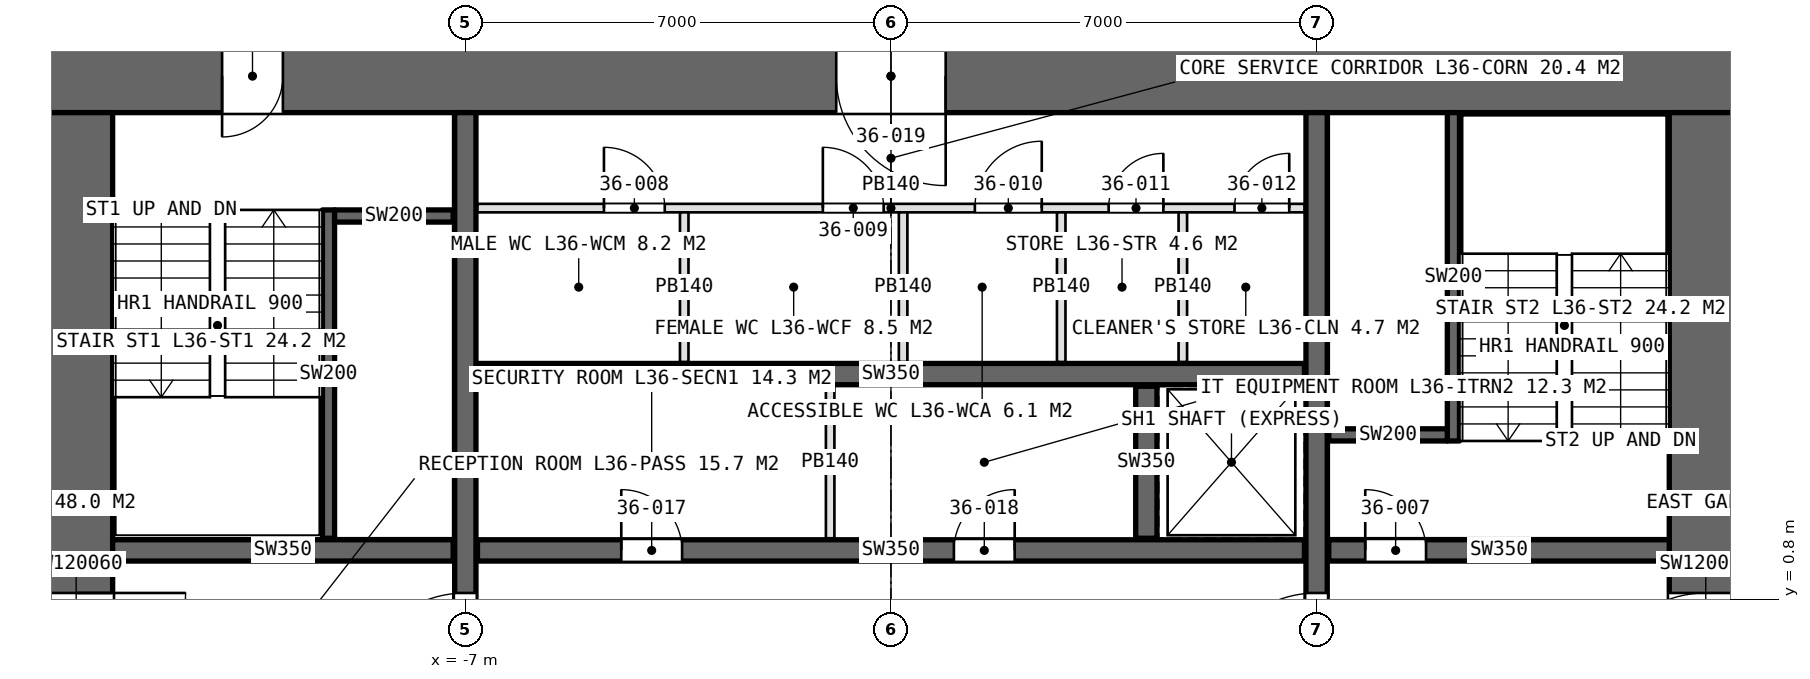
"""IFC4 building model, lengths in metres.
Left out: names, types, materials, properties, quantities, classifications, styles, units other than length and angle.
Written with IfcOpenShell. Run it as: python <this file> out.ifc"""

import sys

from ifc_helpers import new_model, si_unit, direction, frame, frame_2d, origin, place, context, subcontext, project, spatial, rectangle, extrude, element, fill, save


model = new_model("IFC4")
c1 = context("Model", 3, precision=1e-05, world=origin(), true_north=direction((0.0, 1.0)))
c2 = subcontext(c1, "Body", "Model", "MODEL_VIEW")
j1 = project(units=[si_unit("LENGTHUNIT", "METRE"), si_unit("PLANEANGLEUNIT", "RADIAN")], contexts=[c1])
p1 = place(None, origin())
s1 = spatial("IfcSite", under=j1, at=p1, CompositionType="ELEMENT")
p2 = place(p1, origin())
s2 = spatial("IfcBuilding", under=s1, at=p2, CompositionType="ELEMENT")
p3 = place(p2, frame((0.0, 0.0, 168.0)))
s3 = spatial("IfcBuildingStorey", under=s2, at=p3, CompositionType="ELEMENT", Elevation=168.0)
p4 = place(p3, frame((14.0, 9.4, 0.0), z_axis=(0.0, 0.0, 1.0), x_axis=(-1.0, 0.0, 0.0)))
e1 = element("IfcWall", 1, at=p4, inside=s3, PredefinedType="SHEAR", context=c2, shape_type="SweptSolid", body=[
    extrude(rectangle(XDim=28.0, YDim=1.2, at=frame_2d((14.0, 0.0))), origin(), (0.0, 0.0, 1.0), 4.2),
])
p5 = place(p4, frame((24.0, 0.0, 0.0)))
e2 = element("IfcOpeningElement", 2, at=p5, cuts=e1, PredefinedType="OPENING", context=c2, shape_type="SweptSolid", body=[
    extrude(rectangle(XDim=1.0, YDim=2.4, at=frame_2d((0.5, 1.2))), frame((0.0, 0.61, 0.0), z_axis=(0.0, -1.0, 0.0), x_axis=(1.0, 0.0, 0.0)), (0.0, 0.0, 1.0), 1.22),
])
p6 = place(p4, frame((13.1, 0.0, 0.0)))
e3 = element("IfcOpeningElement", 3, at=p6, cuts=e1, PredefinedType="OPENING", context=c2, shape_type="SweptSolid", body=[
    extrude(rectangle(XDim=1.8, YDim=2.4, at=frame_2d((0.9, 1.2))), frame((0.0, 0.61, 0.0), z_axis=(0.0, -1.0, 0.0), x_axis=(1.0, 0.0, 0.0)), (0.0, 0.0, 1.0), 1.22),
])
p7 = place(p3, frame((-13.4, 8.8, 0.0), z_axis=(0.0, 0.0, 1.0), x_axis=(0.0, -1.0, 0.0)))
e4 = element("IfcWall", 4, at=p7, inside=s3, PredefinedType="SHEAR", context=c2, shape_type="SweptSolid", body=[
    extrude(rectangle(XDim=17.6, YDim=1.2, at=frame_2d((8.8, 0.0))), origin(), (0.0, 0.0, 1.0), 4.2),
])
p8 = place(p7, frame((7.9, 0.0, 0.0)))
e5 = element("IfcOpeningElement", 5, at=p8, cuts=e4, PredefinedType="OPENING", context=c2, shape_type="SweptSolid", body=[
    extrude(rectangle(XDim=1.8, YDim=2.4, at=frame_2d((0.9, 1.2))), frame((0.0, 0.61, 0.0), z_axis=(0.0, -1.0, 0.0), x_axis=(1.0, 0.0, 0.0)), (0.0, 0.0, 1.0), 1.22),
])
p9 = place(p7, frame((16.5, 0.0, 0.0)))
e6 = element("IfcOpeningElement", 6, at=p9, cuts=e4, PredefinedType="OPENING", context=c2, shape_type="SweptSolid", body=[
    extrude(rectangle(XDim=1.0, YDim=2.4, at=frame_2d((0.5, 1.2))), frame((0.0, 0.61, 0.0), z_axis=(0.0, -1.0, 0.0), x_axis=(1.0, 0.0, 0.0)), (0.0, 0.0, 1.0), 1.22),
])
p10 = place(p3, frame((13.4, -8.8, 0.0), z_axis=(0.0, 0.0, 1.0), x_axis=(0.0, 1.0, 0.0)))
e7 = element("IfcWall", 7, at=p10, inside=s3, PredefinedType="SHEAR", context=c2, shape_type="SweptSolid", body=[
    extrude(rectangle(XDim=17.6, YDim=1.2, at=frame_2d((8.8, 0.0))), origin(), (0.0, 0.0, 1.0), 4.2),
])
p11 = place(p10, frame((7.9, 0.0, 0.0)))
e8 = element("IfcOpeningElement", 8, at=p11, cuts=e7, PredefinedType="OPENING", context=c2, shape_type="SweptSolid", body=[
    extrude(rectangle(XDim=1.8, YDim=2.4, at=frame_2d((0.9, 1.2))), frame((0.0, 0.61, 0.0), z_axis=(0.0, -1.0, 0.0), x_axis=(1.0, 0.0, 0.0)), (0.0, 0.0, 1.0), 1.22),
])
p12 = place(p3, frame((-7.0, -8.8, 0.0), z_axis=(0.0, 0.0, 1.0), x_axis=(0.0, 1.0, 0.0)))
e9 = element("IfcWall", 9, at=p12, inside=s3, PredefinedType="SHEAR", context=c2, shape_type="SweptSolid", body=[
    extrude(rectangle(XDim=17.6, YDim=0.35, at=frame_2d((8.8, 0.0))), origin(), (0.0, 0.0, 1.0), 4.2),
])
p13 = place(p12, frame((7.9, 0.0, 0.0)))
e10 = element("IfcOpeningElement", 10, at=p13, cuts=e9, PredefinedType="OPENING", context=c2, shape_type="SweptSolid", body=[
    extrude(rectangle(XDim=1.8, YDim=2.4, at=frame_2d((0.9, 1.2))), frame((0.0, 0.185, 0.0), z_axis=(0.0, -1.0, 0.0), x_axis=(1.0, 0.0, 0.0)), (0.0, 0.0, 1.0), 0.37),
])
p14 = place(p3, frame((7.0, -8.8, 0.0), z_axis=(0.0, 0.0, 1.0), x_axis=(0.0, 1.0, 0.0)))
e11 = element("IfcWall", 11, at=p14, inside=s3, PredefinedType="SHEAR", context=c2, shape_type="SweptSolid", body=[
    extrude(rectangle(XDim=17.6, YDim=0.35, at=frame_2d((8.8, 0.0))), origin(), (0.0, 0.0, 1.0), 4.2),
])
p15 = place(p14, frame((7.9, 0.0, 0.0)))
e12 = element("IfcOpeningElement", 12, at=p15, cuts=e11, PredefinedType="OPENING", context=c2, shape_type="SweptSolid", body=[
    extrude(rectangle(XDim=1.8, YDim=2.4, at=frame_2d((0.9, 1.2))), frame((0.0, 0.185, 0.0), z_axis=(0.0, -1.0, 0.0), x_axis=(1.0, 0.0, 0.0)), (0.0, 0.0, 1.0), 0.37),
])
p16 = place(p3, frame((-6.8, 1.6, 0.0), z_axis=(0.0, 0.0, 1.0), x_axis=(1.0, 0.0, 0.0)))
e13 = element("IfcWall", 13, at=p16, inside=s3, PredefinedType="SHEAR", context=c2, shape_type="SweptSolid", body=[
    extrude(rectangle(XDim=13.6, YDim=0.35, at=frame_2d((6.8, 0.0))), origin(), (0.0, 0.0, 1.0), 4.2),
])
p17 = place(p16, frame((2.365, 0.0, 0.0)))
e14 = element("IfcOpeningElement", 14, at=p17, cuts=e13, PredefinedType="OPENING", context=c2, shape_type="SweptSolid", body=[
    extrude(rectangle(XDim=1.0, YDim=2.4, at=frame_2d((0.5, 1.2))), frame((0.0, 0.185, 0.0), z_axis=(0.0, -1.0, 0.0), x_axis=(1.0, 0.0, 0.0)), (0.0, 0.0, 1.0), 0.37),
])
p18 = place(p16, frame((7.835, 0.0, 0.0)))
e15 = element("IfcOpeningElement", 15, at=p18, cuts=e13, PredefinedType="OPENING", context=c2, shape_type="SweptSolid", body=[
    extrude(rectangle(XDim=1.0, YDim=2.4, at=frame_2d((0.5, 1.2))), frame((0.0, 0.185, 0.0), z_axis=(0.0, -1.0, 0.0), x_axis=(1.0, 0.0, 0.0)), (0.0, 0.0, 1.0), 0.37),
])
p19 = place(p3, frame((-6.8, 4.5, 0.0), z_axis=(0.0, 0.0, 1.0), x_axis=(1.0, 0.0, 0.0)))
e16 = element("IfcWall", 16, at=p19, inside=s3, PredefinedType="SHEAR", context=c2, shape_type="SweptSolid", body=[
    extrude(rectangle(XDim=13.6, YDim=0.35, at=frame_2d((6.8, 0.0))), origin(), (0.0, 0.0, 1.0), 4.2),
])
p20 = place(p3, frame((-12.8, 1.6, 0.0), z_axis=(0.0, 0.0, 1.0), x_axis=(1.0, 0.0, 0.0)))
e17 = element("IfcWall", 17, at=p20, inside=s3, PredefinedType="SHEAR", context=c2, shape_type="SweptSolid", body=[
    extrude(rectangle(XDim=5.6, YDim=0.35, at=frame_2d((2.8, 0.0))), origin(), (0.0, 0.0, 1.0), 4.2),
])
p21 = place(p3, frame((7.2, 1.6, 0.0), z_axis=(0.0, 0.0, 1.0), x_axis=(1.0, 0.0, 0.0)))
e18 = element("IfcWall", 18, at=p21, inside=s3, PredefinedType="SHEAR", context=c2, shape_type="SweptSolid", body=[
    extrude(rectangle(XDim=5.6, YDim=0.35, at=frame_2d((2.8, 0.0))), origin(), (0.0, 0.0, 1.0), 4.2),
])
p22 = place(p21, frame((0.6, 0.0, 0.0)))
e19 = element("IfcOpeningElement", 19, at=p22, cuts=e18, PredefinedType="OPENING", context=c2, shape_type="SweptSolid", body=[
    extrude(rectangle(XDim=1.0, YDim=2.4, at=frame_2d((0.5, 1.2))), frame((0.0, 0.185, 0.0), z_axis=(0.0, -1.0, 0.0), x_axis=(1.0, 0.0, 0.0)), (0.0, 0.0, 1.0), 0.37),
])
p23 = place(p3, frame((4.2, 1.8, 0.0), z_axis=(0.0, 0.0, 1.0), x_axis=(0.0, 1.0, 0.0)))
e20 = element("IfcWall", 20, at=p23, inside=s3, PredefinedType="SHEAR", context=c2, shape_type="SweptSolid", body=[
    extrude(rectangle(XDim=2.5, YDim=0.35, at=frame_2d((1.25, 0.0))), origin(), (0.0, 0.0, 1.0), 4.2),
])
p24 = place(p3, frame((-6.8, 7.23, 0.0), z_axis=(0.0, 0.0, 1.0), x_axis=(1.0, 0.0, 0.0)))
e21 = element("IfcWall", 21, at=p24, inside=s3, PredefinedType="PARTITIONING", context=c2, shape_type="SweptSolid", body=[
    extrude(rectangle(XDim=13.6, YDim=0.14, at=frame_2d((6.8, 0.0))), origin(), (0.0, 0.0, 1.0), 3.95),
])
p25 = place(p24, frame((2.08, 0.0, 0.0)))
e22 = element("IfcOpeningElement", 22, at=p25, cuts=e21, PredefinedType="OPENING", context=c2, shape_type="SweptSolid", body=[
    extrude(rectangle(XDim=1.0, YDim=2.4, at=frame_2d((0.5, 1.2))), frame((0.0, 0.08, 0.0), z_axis=(0.0, -1.0, 0.0), x_axis=(1.0, 0.0, 0.0)), (0.0, 0.0, 1.0), 0.16),
])
p26 = place(p24, frame((5.68, 0.0, 0.0)))
e23 = element("IfcOpeningElement", 23, at=p26, cuts=e21, PredefinedType="OPENING", context=c2, shape_type="SweptSolid", body=[
    extrude(rectangle(XDim=1.0, YDim=2.4, at=frame_2d((0.5, 1.2))), frame((0.0, 0.08, 0.0), z_axis=(0.0, -1.0, 0.0), x_axis=(1.0, 0.0, 0.0)), (0.0, 0.0, 1.0), 0.16),
])
p27 = place(p24, frame((8.18, 0.0, 0.0)))
e24 = element("IfcOpeningElement", 24, at=p27, cuts=e21, PredefinedType="OPENING", context=c2, shape_type="SweptSolid", body=[
    extrude(rectangle(XDim=1.1, YDim=2.4, at=frame_2d((0.55, 1.2))), frame((0.0, 0.08, 0.0), z_axis=(0.0, -1.0, 0.0), x_axis=(1.0, 0.0, 0.0)), (0.0, 0.0, 1.0), 0.16),
])
p28 = place(p24, frame((10.38, 0.0, 0.0)))
e25 = element("IfcOpeningElement", 25, at=p28, cuts=e21, PredefinedType="OPENING", context=c2, shape_type="SweptSolid", body=[
    extrude(rectangle(XDim=0.9, YDim=2.4, at=frame_2d((0.45, 1.2))), frame((0.0, 0.08, 0.0), z_axis=(0.0, -1.0, 0.0), x_axis=(1.0, 0.0, 0.0)), (0.0, 0.0, 1.0), 0.16),
])
p29 = place(p24, frame((12.45, 0.0, 0.0)))
e26 = element("IfcOpeningElement", 26, at=p29, cuts=e21, PredefinedType="OPENING", context=c2, shape_type="SweptSolid", body=[
    extrude(rectangle(XDim=0.9, YDim=2.4, at=frame_2d((0.45, 1.2))), frame((0.0, 0.08, 0.0), z_axis=(0.0, -1.0, 0.0), x_axis=(1.0, 0.0, 0.0)), (0.0, 0.0, 1.0), 0.16),
])
for number, where, z_axis, x_axis in (
    (27, (-3.4, 4.7, 0.0), (0.0, 0.0, 1.0), (0.0, 1.0, 0.0)),
    (28, (0.2, 4.7, 0.0), (0.0, 0.0, 1.0), (0.0, 1.0, 0.0)),
    (29, (2.8, 4.7, 0.0), (0.0, 0.0, 1.0), (0.0, 1.0, 0.0)),
    (30, (4.8, 4.7, 0.0), (0.0, 0.0, 1.0), (0.0, 1.0, 0.0)),
):
    element("IfcWall", number, at=place(p3, frame(where, z_axis=z_axis, x_axis=x_axis)), inside=s3, PredefinedType="PARTITIONING", context=c2, shape_type="SweptSolid", body=[
        extrude(rectangle(XDim=2.46, YDim=0.14, at=frame_2d((1.23, 0.0))), origin(), (0.0, 0.0, 1.0), 3.95),
    ])
p30 = place(p3, frame((-1.0, 1.8, 0.0), z_axis=(0.0, 0.0, 1.0), x_axis=(0.0, 1.0, 0.0)))
e31 = element("IfcWall", 31, at=p30, inside=s3, PredefinedType="PARTITIONING", context=c2, shape_type="SweptSolid", body=[
    extrude(rectangle(XDim=2.5, YDim=0.14, at=frame_2d((1.25, 0.0))), origin(), (0.0, 0.0, 1.0), 3.95),
])
p31 = place(p3, frame((-9.25, 7.2, 0.0), z_axis=(0.0, 0.0, 1.0), x_axis=(0.0, -1.0, 0.0)))
e32 = element("IfcWall", 32, at=p31, inside=s3, PredefinedType="SOLIDWALL", context=c2, shape_type="SweptSolid", body=[
    extrude(rectangle(XDim=5.4, YDim=0.2, at=frame_2d((2.7, 0.0))), origin(), (0.0, 0.0, 1.0), 4.2),
])
p32 = place(p3, frame((-9.15, 7.1, 0.0), z_axis=(0.0, 0.0, 1.0), x_axis=(1.0, 0.0, 0.0)))
e33 = element("IfcWall", 33, at=p32, inside=s3, PredefinedType="SOLIDWALL", context=c2, shape_type="SweptSolid", body=[
    extrude(rectangle(XDim=1.95, YDim=0.2, at=frame_2d((0.975, 0.0))), origin(), (0.0, 0.0, 1.0), 4.2),
])
p33 = place(p3, frame((9.25, 3.4, 0.0), z_axis=(0.0, 0.0, 1.0), x_axis=(0.0, 1.0, 0.0)))
e34 = element("IfcWall", 34, at=p33, inside=s3, PredefinedType="SOLIDWALL", context=c2, shape_type="SweptSolid", body=[
    extrude(rectangle(XDim=5.4, YDim=0.2, at=frame_2d((2.7, 0.0))), origin(), (0.0, 0.0, 1.0), 4.2),
])
p34 = place(p3, frame((9.15, 3.5, 0.0), z_axis=(0.0, 0.0, 1.0), x_axis=(-1.0, 0.0, 0.0)))
e35 = element("IfcWall", 35, at=p34, inside=s3, PredefinedType="SOLIDWALL", context=c2, shape_type="SweptSolid", body=[
    extrude(rectangle(XDim=1.95, YDim=0.2, at=frame_2d((0.975, 0.0))), origin(), (0.0, 0.0, 1.0), 4.2),
])
p35 = place(p8, origin())
e36 = element("IfcDoor", 36, at=p35, inside=s3, OperationType="DOUBLE_DOOR_SINGLE_SWING", PredefinedType="DOOR", context=c2, shape_type="SweptSolid", body=[
    extrude(rectangle(XDim=1.8, YDim=2.4, at=frame_2d((0.9, 1.2))), frame((0.0, 0.025, 0.0), z_axis=(0.0, -1.0, 0.0), x_axis=(1.0, 0.0, 0.0)), (0.0, 0.0, 1.0), 0.05),
])
fill(e5, e36)
p36 = place(p11, origin())
e37 = element("IfcDoor", 37, at=p36, inside=s3, OperationType="DOUBLE_DOOR_SINGLE_SWING", PredefinedType="DOOR", context=c2, shape_type="SweptSolid", body=[
    extrude(rectangle(XDim=1.8, YDim=2.4, at=frame_2d((0.9, 1.2))), frame((0.0, 0.025, 0.0), z_axis=(0.0, -1.0, 0.0), x_axis=(1.0, 0.0, 0.0)), (0.0, 0.0, 1.0), 0.05),
])
fill(e8, e37)
p37 = place(p13, origin())
e38 = element("IfcDoor", 38, at=p37, inside=s3, OperationType="DOUBLE_DOOR_SINGLE_SWING", PredefinedType="DOOR", context=c2, shape_type="SweptSolid", body=[
    extrude(rectangle(XDim=1.8, YDim=2.4, at=frame_2d((0.9, 1.2))), frame((0.0, 0.025, 0.0), z_axis=(0.0, -1.0, 0.0), x_axis=(1.0, 0.0, 0.0)), (0.0, 0.0, 1.0), 0.05),
])
fill(e10, e38)
p38 = place(p15, origin())
e39 = element("IfcDoor", 39, at=p38, inside=s3, OperationType="DOUBLE_DOOR_SINGLE_SWING", PredefinedType="DOOR", context=c2, shape_type="SweptSolid", body=[
    extrude(rectangle(XDim=1.8, YDim=2.4, at=frame_2d((0.9, 1.2))), frame((0.0, 0.025, 0.0), z_axis=(0.0, -1.0, 0.0), x_axis=(1.0, 0.0, 0.0)), (0.0, 0.0, 1.0), 0.05),
])
fill(e12, e39)
p39 = place(p5, origin())
e40 = element("IfcDoor", 40, at=p39, inside=s3, OperationType="SINGLE_SWING_RIGHT", PredefinedType="DOOR", context=c2, shape_type="SweptSolid", body=[
    extrude(rectangle(XDim=1.0, YDim=2.4, at=frame_2d((0.5, 1.2))), frame((0.0, 0.025, 0.0), z_axis=(0.0, -1.0, 0.0), x_axis=(1.0, 0.0, 0.0)), (0.0, 0.0, 1.0), 0.05),
])
fill(e2, e40)
p40 = place(p22, origin())
e41 = element("IfcDoor", 41, at=p40, inside=s3, OperationType="SINGLE_SWING_LEFT", PredefinedType="DOOR", context=c2, shape_type="SweptSolid", body=[
    extrude(rectangle(XDim=1.0, YDim=2.4, at=frame_2d((0.5, 1.2))), frame((0.0, 0.025, 0.0), z_axis=(0.0, -1.0, 0.0), x_axis=(1.0, 0.0, 0.0)), (0.0, 0.0, 1.0), 0.05),
])
fill(e19, e41)
p41 = place(p25, origin())
e42 = element("IfcDoor", 42, at=p41, inside=s3, OperationType="SINGLE_SWING_LEFT", PredefinedType="DOOR", context=c2, shape_type="SweptSolid", body=[
    extrude(rectangle(XDim=1.0, YDim=2.4, at=frame_2d((0.5, 1.2))), frame((0.0, 0.025, 0.0), z_axis=(0.0, -1.0, 0.0), x_axis=(1.0, 0.0, 0.0)), (0.0, 0.0, 1.0), 0.05),
])
fill(e22, e42)
p42 = place(p26, origin())
e43 = element("IfcDoor", 43, at=p42, inside=s3, OperationType="SINGLE_SWING_LEFT", PredefinedType="DOOR", context=c2, shape_type="SweptSolid", body=[
    extrude(rectangle(XDim=1.0, YDim=2.4, at=frame_2d((0.5, 1.2))), frame((0.0, 0.025, 0.0), z_axis=(0.0, -1.0, 0.0), x_axis=(1.0, 0.0, 0.0)), (0.0, 0.0, 1.0), 0.05),
])
fill(e23, e43)
p43 = place(p27, origin())
e44 = element("IfcDoor", 44, at=p43, inside=s3, OperationType="SINGLE_SWING_RIGHT", PredefinedType="DOOR", context=c2, shape_type="SweptSolid", body=[
    extrude(rectangle(XDim=1.1, YDim=2.4, at=frame_2d((0.55, 1.2))), frame((0.0, 0.025, 0.0), z_axis=(0.0, -1.0, 0.0), x_axis=(1.0, 0.0, 0.0)), (0.0, 0.0, 1.0), 0.05),
])
fill(e24, e44)
p44 = place(p28, origin())
e45 = element("IfcDoor", 45, at=p44, inside=s3, OperationType="SINGLE_SWING_RIGHT", PredefinedType="DOOR", context=c2, shape_type="SweptSolid", body=[
    extrude(rectangle(XDim=0.9, YDim=2.4, at=frame_2d((0.45, 1.2))), frame((0.0, 0.025, 0.0), z_axis=(0.0, -1.0, 0.0), x_axis=(1.0, 0.0, 0.0)), (0.0, 0.0, 1.0), 0.05),
])
fill(e25, e45)
p45 = place(p29, origin())
e46 = element("IfcDoor", 46, at=p45, inside=s3, OperationType="SINGLE_SWING_RIGHT", PredefinedType="DOOR", context=c2, shape_type="SweptSolid", body=[
    extrude(rectangle(XDim=0.9, YDim=2.4, at=frame_2d((0.45, 1.2))), frame((0.0, 0.025, 0.0), z_axis=(0.0, -1.0, 0.0), x_axis=(1.0, 0.0, 0.0)), (0.0, 0.0, 1.0), 0.05),
])
fill(e26, e46)
p46 = place(p17, origin())
e47 = element("IfcDoor", 47, at=p46, inside=s3, OperationType="SINGLE_SWING_LEFT", PredefinedType="DOOR", context=c2, shape_type="SweptSolid", body=[
    extrude(rectangle(XDim=1.0, YDim=2.4, at=frame_2d((0.5, 1.2))), frame((0.0, 0.025, 0.0), z_axis=(0.0, -1.0, 0.0), x_axis=(1.0, 0.0, 0.0)), (0.0, 0.0, 1.0), 0.05),
])
fill(e14, e47)
p47 = place(p18, origin())
e48 = element("IfcDoor", 48, at=p47, inside=s3, OperationType="SINGLE_SWING_RIGHT", PredefinedType="DOOR", context=c2, shape_type="SweptSolid", body=[
    extrude(rectangle(XDim=1.0, YDim=2.4, at=frame_2d((0.5, 1.2))), frame((0.0, 0.025, 0.0), z_axis=(0.0, -1.0, 0.0), x_axis=(1.0, 0.0, 0.0)), (0.0, 0.0, 1.0), 0.05),
])
fill(e15, e48)
p48 = place(p6, origin())
e49 = element("IfcDoor", 49, at=p48, inside=s3, OperationType="DOUBLE_DOOR_SINGLE_SWING", PredefinedType="DOOR", context=c2, shape_type="SweptSolid", body=[
    extrude(rectangle(XDim=1.8, YDim=2.4, at=frame_2d((0.9, 1.2))), frame((0.0, 0.025, 0.0), z_axis=(0.0, -1.0, 0.0), x_axis=(1.0, 0.0, 0.0)), (0.0, 0.0, 1.0), 0.05),
])
fill(e3, e49)
save(model, sys.argv[1])
